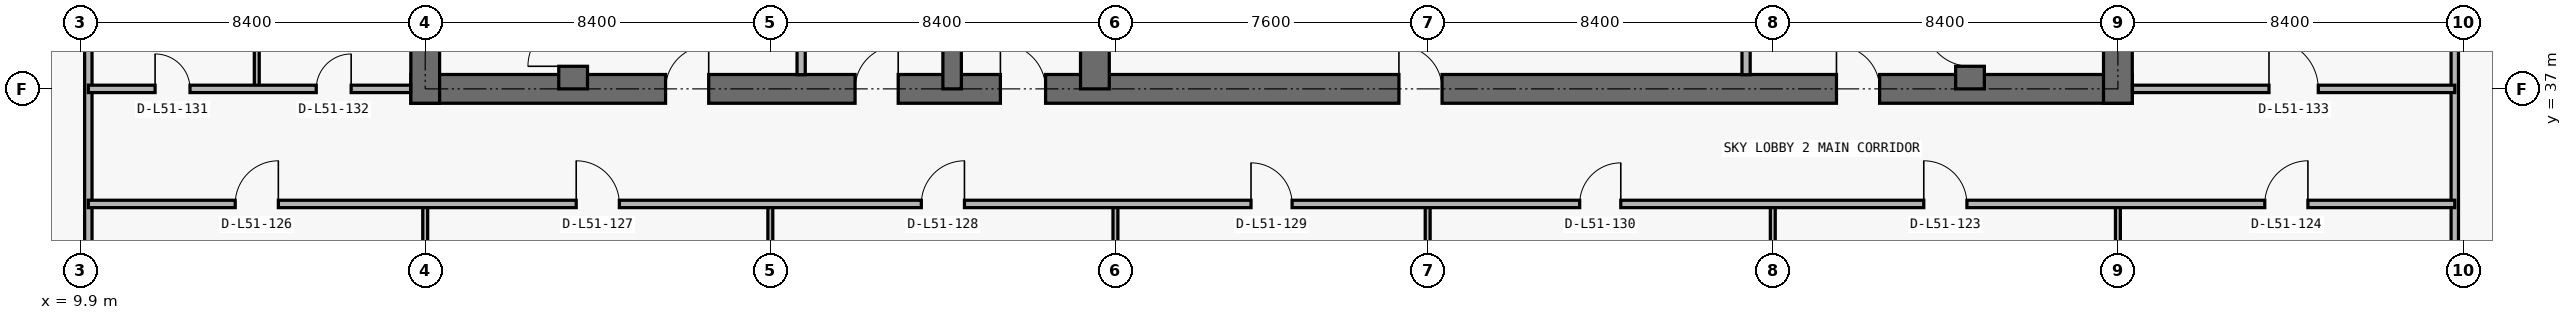
"""IFC4 building model, lengths in metres.
Left out: names, types, materials, properties, quantities, classifications, styles, units other than length and angle.
Written with IfcOpenShell. Run it as: python <this file> out.ifc"""

import sys

from ifc_helpers import new_model, si_unit, direction, frame, frame_2d, origin, place, context, subcontext, project, spatial, rectangle, extrude, element, fill, save


model = new_model("IFC4")
c1 = context("Model", 3, precision=1e-05, world=origin(), true_north=direction((0.0, 1.0)))
c2 = subcontext(c1, "Body", "Model", "MODEL_VIEW")
j1 = project(units=[si_unit("LENGTHUNIT", "METRE"), si_unit("PLANEANGLEUNIT", "RADIAN")], contexts=[c1])
p1 = place(None, origin())
s1 = spatial("IfcSite", under=j1, at=p1, CompositionType="ELEMENT")
p2 = place(p1, origin())
s2 = spatial("IfcBuilding", under=s1, at=p2, CompositionType="ELEMENT")
p3 = place(p2, frame((0.0, 0.0, 183.6)))
s3 = spatial("IfcBuildingStorey", under=s2, at=p3, CompositionType="ELEMENT", Elevation=183.6)
p4 = place(p3, frame((17.95, 37.0, 0.0), z_axis=(0.0, 0.0, 1.0), x_axis=(1.0, 0.0, 0.0)))
e1 = element("IfcWall", 1, at=p4, inside=s3, PredefinedType="SHEAR", context=c2, shape_type="SweptSolid", body=[
    extrude(rectangle(XDim=41.9, YDim=0.7, at=frame_2d((20.95, 0.0))), origin(), (0.0, 0.0, 1.0), 4.55),
])
p5 = place(p4, frame((14.35, 0.0, 0.0)))
e2 = element("IfcOpeningElement", 2, at=p5, cuts=e1, PredefinedType="OPENING", context=c2, shape_type="SweptSolid", body=[
    extrude(rectangle(XDim=1.1, YDim=2.15, at=frame_2d((0.55, 1.075))), frame((0.0, 0.36, 0.0), z_axis=(0.0, -1.0, 0.0), x_axis=(1.0, 0.0, 0.0)), (0.0, 0.0, 1.0), 0.72),
])
p6 = place(p4, frame((6.2, 0.0, 0.0)))
e3 = element("IfcOpeningElement", 3, at=p6, cuts=e1, PredefinedType="OPENING", context=c2, shape_type="SweptSolid", body=[
    extrude(rectangle(XDim=1.05, YDim=2.15, at=frame_2d((0.525, 1.075))), frame((0.0, 0.36, 0.0), z_axis=(0.0, -1.0, 0.0), x_axis=(1.0, 0.0, 0.0)), (0.0, 0.0, 1.0), 0.72),
])
p7 = place(p4, frame((34.7, 0.0, 0.0)))
e4 = element("IfcOpeningElement", 4, at=p7, cuts=e1, PredefinedType="OPENING", context=c2, shape_type="SweptSolid", body=[
    extrude(rectangle(XDim=1.05, YDim=2.15, at=frame_2d((0.525, 1.075))), frame((0.0, 0.36, 0.0), z_axis=(0.0, -1.0, 0.0), x_axis=(1.0, 0.0, 0.0)), (0.0, 0.0, 1.0), 0.72),
])
p8 = place(p4, frame((10.812, 0.0, 0.0)))
e5 = element("IfcOpeningElement", 5, at=p8, cuts=e1, PredefinedType="OPENING", context=c2, shape_type="SweptSolid", body=[
    extrude(rectangle(XDim=1.05, YDim=2.15, at=frame_2d((0.525, 1.075))), frame((0.0, 0.36, 0.0), z_axis=(0.0, -1.0, 0.0), x_axis=(1.0, 0.0, 0.0)), (0.0, 0.0, 1.0), 0.72),
])
p9 = place(p4, frame((24.05, 0.0, 0.0)))
e6 = element("IfcOpeningElement", 6, at=p9, cuts=e1, PredefinedType="OPENING", context=c2, shape_type="SweptSolid", body=[
    extrude(rectangle(XDim=1.05, YDim=2.15, at=frame_2d((0.525, 1.075))), frame((0.0, 0.36, 0.0), z_axis=(0.0, -1.0, 0.0), x_axis=(1.0, 0.0, 0.0)), (0.0, 0.0, 1.0), 0.72),
])
for number, where, z_axis, x_axis in (
    (7, (18.3, 36.65, 0.0), (0.0, 0.0, 1.0), (0.0, 1.0, 0.0)),
    (8, (59.5, 36.65, 0.0), (0.0, 0.0, 1.0), (0.0, 1.0, 0.0)),
):
    element("IfcWall", number, at=place(p3, frame(where, z_axis=z_axis, x_axis=x_axis)), inside=s3, PredefinedType="SHEAR", context=c2, shape_type="SweptSolid", body=[
        extrude(rectangle(XDim=13.95, YDim=0.7, at=frame_2d((6.975, 0.0))), origin(), (0.0, 0.0, 1.0), 4.55),
    ])
p10 = place(p3, frame((21.9, 37.0, 0.0), z_axis=(0.0, 0.0, 1.0), x_axis=(0.0, 1.0, 0.0)))
e9 = element("IfcWall", 9, at=p10, inside=s3, PredefinedType="SHEAR", context=c2, shape_type="SweptSolid", body=[
    extrude(rectangle(XDim=9.575, YDim=0.7, at=frame_2d((4.788, 0.0))), origin(), (0.0, 0.0, 1.0), 4.55),
])
p11 = place(p10, frame((0.55, 0.0, 0.0)))
e10 = element("IfcOpeningElement", 10, at=p11, cuts=e9, PredefinedType="OPENING", context=c2, shape_type="SweptSolid", body=[
    extrude(rectangle(XDim=1.1, YDim=2.15, at=frame_2d((0.55, 1.075))), frame((0.0, 0.36, 0.0), z_axis=(0.0, -1.0, 0.0), x_axis=(1.0, 0.0, 0.0)), (0.0, 0.0, 1.0), 0.72),
])
p12 = place(p3, frame((55.9, 37.0, 0.0), z_axis=(0.0, 0.0, 1.0), x_axis=(0.0, 1.0, 0.0)))
e11 = element("IfcWall", 11, at=p12, inside=s3, PredefinedType="SHEAR", context=c2, shape_type="SweptSolid", body=[
    extrude(rectangle(XDim=9.575, YDim=0.7, at=frame_2d((4.788, 0.0))), origin(), (0.0, 0.0, 1.0), 4.55),
])
p13 = place(p12, frame((0.55, 0.0, 0.0)))
e12 = element("IfcOpeningElement", 12, at=p13, cuts=e11, PredefinedType="OPENING", context=c2, shape_type="SweptSolid", body=[
    extrude(rectangle(XDim=1.1, YDim=2.15, at=frame_2d((0.55, 1.075))), frame((0.0, 0.36, 0.0), z_axis=(0.0, -1.0, 0.0), x_axis=(1.0, 0.0, 0.0)), (0.0, 0.0, 1.0), 0.72),
])
p14 = place(p3, frame((31.125, 37.0, 0.0), z_axis=(0.0, 0.0, 1.0), x_axis=(0.0, 1.0, 0.0)))
e13 = element("IfcWall", 13, at=p14, inside=s3, PredefinedType="SHEAR", context=c2, shape_type="SweptSolid", body=[
    extrude(rectangle(XDim=9.575, YDim=0.45, at=frame_2d((4.788, 0.0))), origin(), (0.0, 0.0, 1.0), 4.55),
])
p15 = place(p3, frame((34.6, 37.0, 0.0), z_axis=(0.0, 0.0, 1.0), x_axis=(0.0, 1.0, 0.0)))
e14 = element("IfcWall", 14, at=p15, inside=s3, PredefinedType="SHEAR", context=c2, shape_type="SweptSolid", body=[
    extrude(rectangle(XDim=9.575, YDim=0.7, at=frame_2d((4.788, 0.0))), origin(), (0.0, 0.0, 1.0), 4.55),
])
p16 = place(p3, frame((10.1, 11.285, 0.0), z_axis=(0.0, 0.0, 1.0), x_axis=(0.0, 1.0, 0.0)))
e15 = element("IfcWall", 15, at=p16, inside=s3, PredefinedType="PARTITIONING", context=c2, shape_type="SweptSolid", body=[
    extrude(rectangle(XDim=35.595, YDim=0.18, at=frame_2d((17.797, 0.0))), origin(), (0.0, 0.0, 1.0), 3.514),
])
p17 = place(p3, frame((14.2, 37.0, 0.0), z_axis=(0.0, 0.0, 1.0), x_axis=(0.0, 1.0, 0.0)))
e16 = element("IfcWall", 16, at=p17, inside=s3, PredefinedType="PARTITIONING", context=c2, shape_type="SweptSolid", body=[
    extrude(rectangle(XDim=6.8, YDim=0.12, at=frame_2d((3.4, 0.0))), origin(), (0.0, 0.0, 1.0), 3.923),
])
p18 = place(p3, frame((18.3, 7.895, 0.0), z_axis=(0.0, 0.0, 1.0), x_axis=(0.0, 1.0, 0.0)))
e17 = element("IfcWall", 17, at=p18, inside=s3, PredefinedType="PARTITIONING", context=c2, shape_type="SweptSolid", body=[
    extrude(rectangle(XDim=26.305, YDim=0.12, at=frame_2d((13.152, 0.0))), origin(), (0.0, 0.0, 1.0), 3.514),
])
p19 = place(p3, frame((26.7, 29.405, 0.0), z_axis=(0.0, 0.0, 1.0), x_axis=(0.0, 1.0, 0.0)))
e18 = element("IfcWall", 18, at=p19, inside=s3, PredefinedType="PARTITIONING", context=c2, shape_type="SweptSolid", body=[
    extrude(rectangle(XDim=4.795, YDim=0.12, at=frame_2d((2.397, 0.0))), origin(), (0.0, 0.0, 1.0), 3.835),
])
p20 = place(p3, frame((27.45, 37.345, 0.0), z_axis=(0.0, 0.0, 1.0), x_axis=(0.0, 1.0, 0.0)))
e19 = element("IfcWall", 19, at=p20, inside=s3, PredefinedType="PARTITIONING", context=c2, shape_type="SweptSolid", body=[
    extrude(rectangle(XDim=5.385, YDim=0.2, at=frame_2d((2.692, 0.0))), origin(), (0.0, 0.0, 1.0), 4.55),
])
for number, where, z_axis, x_axis in (
    (20, (35.1, 7.855, 0.0), (0.0, 0.0, 1.0), (0.0, 1.0, 0.0)),
    (21, (42.7, 7.855, 0.0), (0.0, 0.0, 1.0), (0.0, 1.0, 0.0)),
):
    element("IfcWall", number, at=place(p3, frame(where, z_axis=z_axis, x_axis=x_axis)), inside=s3, PredefinedType="PARTITIONING", context=c2, shape_type="SweptSolid", body=[
        extrude(rectangle(XDim=26.345, YDim=0.12, at=frame_2d((13.172, 0.0))), origin(), (0.0, 0.0, 1.0), 3.514),
    ])
p21 = place(p3, frame((50.45, 37.345, 0.0), z_axis=(0.0, 0.0, 1.0), x_axis=(0.0, 1.0, 0.0)))
e22 = element("IfcWall", 22, at=p21, inside=s3, PredefinedType="PARTITIONING", context=c2, shape_type="SweptSolid", body=[
    extrude(rectangle(XDim=5.385, YDim=0.2, at=frame_2d((2.692, 0.0))), origin(), (0.0, 0.0, 1.0), 4.55),
])
p22 = place(p3, frame((51.1, 29.405, 0.0), z_axis=(0.0, 0.0, 1.0), x_axis=(0.0, 1.0, 0.0)))
e23 = element("IfcWall", 23, at=p22, inside=s3, PredefinedType="PARTITIONING", context=c2, shape_type="SweptSolid", body=[
    extrude(rectangle(XDim=4.795, YDim=0.12, at=frame_2d((2.397, 0.0))), origin(), (0.0, 0.0, 1.0), 3.835),
])
p23 = place(p3, frame((59.5, 7.895, 0.0), z_axis=(0.0, 0.0, 1.0), x_axis=(0.0, 1.0, 0.0)))
e24 = element("IfcWall", 24, at=p23, inside=s3, PredefinedType="PARTITIONING", context=c2, shape_type="SweptSolid", body=[
    extrude(rectangle(XDim=26.305, YDim=0.12, at=frame_2d((13.152, 0.0))), origin(), (0.0, 0.0, 1.0), 3.514),
])
p24 = place(p3, frame((67.7, 11.32, 0.0), z_axis=(0.0, 0.0, 1.0), x_axis=(0.0, 1.0, 0.0)))
e25 = element("IfcWall", 25, at=p24, inside=s3, PredefinedType="PARTITIONING", context=c2, shape_type="SweptSolid", body=[
    extrude(rectangle(XDim=35.56, YDim=0.18, at=frame_2d((17.78, 0.0))), origin(), (0.0, 0.0, 1.0), 3.514),
])
p25 = place(p3, frame((10.1, 34.2, 0.0), z_axis=(0.0, 0.0, 1.0), x_axis=(1.0, 0.0, 0.0)))
e26 = element("IfcWall", 26, at=p25, inside=s3, PredefinedType="PARTITIONING", context=c2, shape_type="SweptSolid", body=[
    extrude(rectangle(XDim=57.6, YDim=0.18, at=frame_2d((28.8, 0.0))), origin(), (0.0, 0.0, 1.0), 4.55),
])
p26 = place(p25, frame((44.675, 0.0, 0.0)))
e27 = element("IfcOpeningElement", 27, at=p26, cuts=e26, PredefinedType="OPENING", context=c2, shape_type="SweptSolid", body=[
    extrude(rectangle(XDim=1.05, YDim=2.15, at=frame_2d((0.525, 1.075))), frame((0.0, 0.1, 0.0), z_axis=(0.0, -1.0, 0.0), x_axis=(1.0, 0.0, 0.0)), (0.0, 0.0, 1.0), 0.2),
])
p27 = place(p25, frame((52.975, 0.0, 0.0)))
e28 = element("IfcOpeningElement", 28, at=p27, cuts=e26, PredefinedType="OPENING", context=c2, shape_type="SweptSolid", body=[
    extrude(rectangle(XDim=1.05, YDim=2.15, at=frame_2d((0.525, 1.075))), frame((0.0, 0.1, 0.0), z_axis=(0.0, -1.0, 0.0), x_axis=(1.0, 0.0, 0.0)), (0.0, 0.0, 1.0), 0.2),
])
p28 = place(p25, frame((3.575, 0.0, 0.0)))
e29 = element("IfcOpeningElement", 29, at=p28, cuts=e26, PredefinedType="OPENING", context=c2, shape_type="SweptSolid", body=[
    extrude(rectangle(XDim=1.05, YDim=2.15, at=frame_2d((0.525, 1.075))), frame((0.0, 0.1, 0.0), z_axis=(0.0, -1.0, 0.0), x_axis=(1.0, 0.0, 0.0)), (0.0, 0.0, 1.0), 0.2),
])
p29 = place(p25, frame((11.875, 0.0, 0.0)))
e30 = element("IfcOpeningElement", 30, at=p29, cuts=e26, PredefinedType="OPENING", context=c2, shape_type="SweptSolid", body=[
    extrude(rectangle(XDim=1.05, YDim=2.15, at=frame_2d((0.525, 1.075))), frame((0.0, 0.1, 0.0), z_axis=(0.0, -1.0, 0.0), x_axis=(1.0, 0.0, 0.0)), (0.0, 0.0, 1.0), 0.2),
])
p30 = place(p25, frame((20.275, 0.0, 0.0)))
e31 = element("IfcOpeningElement", 31, at=p30, cuts=e26, PredefinedType="OPENING", context=c2, shape_type="SweptSolid", body=[
    extrude(rectangle(XDim=1.05, YDim=2.15, at=frame_2d((0.525, 1.075))), frame((0.0, 0.1, 0.0), z_axis=(0.0, -1.0, 0.0), x_axis=(1.0, 0.0, 0.0)), (0.0, 0.0, 1.0), 0.2),
])
p31 = place(p25, frame((28.3, 0.0, 0.0)))
e32 = element("IfcOpeningElement", 32, at=p31, cuts=e26, PredefinedType="OPENING", context=c2, shape_type="SweptSolid", body=[
    extrude(rectangle(XDim=1.0, YDim=2.2, at=frame_2d((0.5, 1.1))), frame((0.0, 0.1, 0.0), z_axis=(0.0, -1.0, 0.0), x_axis=(1.0, 0.0, 0.0)), (0.0, 0.0, 1.0), 0.2),
])
p32 = place(p25, frame((36.3, 0.0, 0.0)))
e33 = element("IfcOpeningElement", 33, at=p32, cuts=e26, PredefinedType="OPENING", context=c2, shape_type="SweptSolid", body=[
    extrude(rectangle(XDim=1.0, YDim=2.2, at=frame_2d((0.5, 1.1))), frame((0.0, 0.1, 0.0), z_axis=(0.0, -1.0, 0.0), x_axis=(1.0, 0.0, 0.0)), (0.0, 0.0, 1.0), 0.2),
])
p33 = place(p3, frame((10.1, 37.0, 0.0), z_axis=(0.0, 0.0, 1.0), x_axis=(1.0, 0.0, 0.0)))
e34 = element("IfcWall", 34, at=p33, inside=s3, PredefinedType="PARTITIONING", context=c2, shape_type="SweptSolid", body=[
    extrude(rectangle(XDim=7.845, YDim=0.18, at=frame_2d((3.922, 0.0))), origin(), (0.0, 0.0, 1.0), 4.55),
])
p34 = place(p33, frame((1.625, 0.0, 0.0)))
e35 = element("IfcOpeningElement", 35, at=p34, cuts=e34, PredefinedType="OPENING", context=c2, shape_type="SweptSolid", body=[
    extrude(rectangle(XDim=0.85, YDim=2.1, at=frame_2d((0.425, 1.05))), frame((0.0, 0.1, 0.0), z_axis=(0.0, -1.0, 0.0), x_axis=(1.0, 0.0, 0.0)), (0.0, 0.0, 1.0), 0.2),
])
p35 = place(p33, frame((5.548, 0.0, 0.0)))
e36 = element("IfcOpeningElement", 36, at=p35, cuts=e34, PredefinedType="OPENING", context=c2, shape_type="SweptSolid", body=[
    extrude(rectangle(XDim=0.85, YDim=2.1, at=frame_2d((0.425, 1.05))), frame((0.0, 0.1, 0.0), z_axis=(0.0, -1.0, 0.0), x_axis=(1.0, 0.0, 0.0)), (0.0, 0.0, 1.0), 0.2),
])
p36 = place(p3, frame((59.855, 37.0, 0.0), z_axis=(0.0, 0.0, 1.0), x_axis=(1.0, 0.0, 0.0)))
e37 = element("IfcWall", 37, at=p36, inside=s3, PredefinedType="PARTITIONING", context=c2, shape_type="SweptSolid", body=[
    extrude(rectangle(XDim=7.845, YDim=0.18, at=frame_2d((3.922, 0.0))), origin(), (0.0, 0.0, 1.0), 4.55),
])
p37 = place(p36, frame((3.323, 0.0, 0.0)))
e38 = element("IfcOpeningElement", 38, at=p37, cuts=e37, PredefinedType="OPENING", context=c2, shape_type="SweptSolid", body=[
    extrude(rectangle(XDim=1.2, YDim=2.2, at=frame_2d((0.6, 1.1))), frame((0.0, 0.1, 0.0), z_axis=(0.0, -1.0, 0.0), x_axis=(1.0, 0.0, 0.0)), (0.0, 0.0, 1.0), 0.2),
])
p38 = place(p5, origin())
e39 = element("IfcDoor", 39, at=p38, inside=s3, OperationType="SINGLE_SWING_LEFT", PredefinedType="DOOR", context=c2, shape_type="SweptSolid", body=[
    extrude(rectangle(XDim=1.1, YDim=2.15, at=frame_2d((0.55, 1.075))), frame((0.0, 0.025, 0.0), z_axis=(0.0, -1.0, 0.0), x_axis=(1.0, 0.0, 0.0)), (0.0, 0.0, 1.0), 0.05),
])
fill(e2, e39)
p39 = place(p6, origin())
e40 = element("IfcDoor", 40, at=p39, inside=s3, OperationType="SINGLE_SWING_RIGHT", PredefinedType="DOOR", context=c2, shape_type="SweptSolid", body=[
    extrude(rectangle(XDim=1.05, YDim=2.15, at=frame_2d((0.525, 1.075))), frame((0.0, 0.025, 0.0), z_axis=(0.0, -1.0, 0.0), x_axis=(1.0, 0.0, 0.0)), (0.0, 0.0, 1.0), 0.05),
])
fill(e3, e40)
p40 = place(p11, origin())
e41 = element("IfcDoor", 41, at=p40, inside=s3, OperationType="SINGLE_SWING_LEFT", PredefinedType="DOOR", context=c2, shape_type="SweptSolid", body=[
    extrude(rectangle(XDim=1.1, YDim=2.15, at=frame_2d((0.55, 1.075))), frame((0.0, 0.025, 0.0), z_axis=(0.0, -1.0, 0.0), x_axis=(1.0, 0.0, 0.0)), (0.0, 0.0, 1.0), 0.05),
])
fill(e10, e41)
p41 = place(p7, origin())
e42 = element("IfcDoor", 42, at=p41, inside=s3, OperationType="SINGLE_SWING_LEFT", PredefinedType="DOOR", context=c2, shape_type="SweptSolid", body=[
    extrude(rectangle(XDim=1.05, YDim=2.15, at=frame_2d((0.525, 1.075))), frame((0.0, 0.025, 0.0), z_axis=(0.0, -1.0, 0.0), x_axis=(1.0, 0.0, 0.0)), (0.0, 0.0, 1.0), 0.05),
])
fill(e4, e42)
p42 = place(p13, origin())
e43 = element("IfcDoor", 43, at=p42, inside=s3, OperationType="SINGLE_SWING_RIGHT", PredefinedType="DOOR", context=c2, shape_type="SweptSolid", body=[
    extrude(rectangle(XDim=1.1, YDim=2.15, at=frame_2d((0.55, 1.075))), frame((0.0, 0.025, 0.0), z_axis=(0.0, -1.0, 0.0), x_axis=(1.0, 0.0, 0.0)), (0.0, 0.0, 1.0), 0.05),
])
fill(e12, e43)
p43 = place(p8, origin())
e44 = element("IfcDoor", 44, at=p43, inside=s3, OperationType="SINGLE_SWING_RIGHT", PredefinedType="DOOR", context=c2, shape_type="SweptSolid", body=[
    extrude(rectangle(XDim=1.05, YDim=2.15, at=frame_2d((0.525, 1.075))), frame((0.0, 0.025, 0.0), z_axis=(0.0, -1.0, 0.0), x_axis=(1.0, 0.0, 0.0)), (0.0, 0.0, 1.0), 0.05),
])
fill(e5, e44)
p44 = place(p9, origin())
e45 = element("IfcDoor", 45, at=p44, inside=s3, OperationType="SINGLE_SWING_LEFT", PredefinedType="DOOR", context=c2, shape_type="SweptSolid", body=[
    extrude(rectangle(XDim=1.05, YDim=2.15, at=frame_2d((0.525, 1.075))), frame((0.0, 0.025, 0.0), z_axis=(0.0, -1.0, 0.0), x_axis=(1.0, 0.0, 0.0)), (0.0, 0.0, 1.0), 0.05),
])
fill(e6, e45)
p45 = place(p26, origin())
e46 = element("IfcDoor", 46, at=p45, inside=s3, OperationType="SINGLE_SWING_LEFT", PredefinedType="DOOR", context=c2, shape_type="SweptSolid", body=[
    extrude(rectangle(XDim=1.05, YDim=2.15, at=frame_2d((0.525, 1.075))), frame((0.0, 0.025, 0.0), z_axis=(0.0, -1.0, 0.0), x_axis=(1.0, 0.0, 0.0)), (0.0, 0.0, 1.0), 0.05),
])
fill(e27, e46)
p46 = place(p27, origin())
e47 = element("IfcDoor", 47, at=p46, inside=s3, OperationType="SINGLE_SWING_RIGHT", PredefinedType="DOOR", context=c2, shape_type="SweptSolid", body=[
    extrude(rectangle(XDim=1.05, YDim=2.15, at=frame_2d((0.525, 1.075))), frame((0.0, 0.025, 0.0), z_axis=(0.0, -1.0, 0.0), x_axis=(1.0, 0.0, 0.0)), (0.0, 0.0, 1.0), 0.05),
])
fill(e28, e47)
p47 = place(p28, origin())
e48 = element("IfcDoor", 48, at=p47, inside=s3, OperationType="SINGLE_SWING_RIGHT", PredefinedType="DOOR", context=c2, shape_type="SweptSolid", body=[
    extrude(rectangle(XDim=1.05, YDim=2.15, at=frame_2d((0.525, 1.075))), frame((0.0, 0.025, 0.0), z_axis=(0.0, -1.0, 0.0), x_axis=(1.0, 0.0, 0.0)), (0.0, 0.0, 1.0), 0.05),
])
fill(e29, e48)
p48 = place(p29, origin())
e49 = element("IfcDoor", 49, at=p48, inside=s3, OperationType="SINGLE_SWING_LEFT", PredefinedType="DOOR", context=c2, shape_type="SweptSolid", body=[
    extrude(rectangle(XDim=1.05, YDim=2.15, at=frame_2d((0.525, 1.075))), frame((0.0, 0.025, 0.0), z_axis=(0.0, -1.0, 0.0), x_axis=(1.0, 0.0, 0.0)), (0.0, 0.0, 1.0), 0.05),
])
fill(e30, e49)
p49 = place(p30, origin())
e50 = element("IfcDoor", 50, at=p49, inside=s3, OperationType="SINGLE_SWING_RIGHT", PredefinedType="DOOR", context=c2, shape_type="SweptSolid", body=[
    extrude(rectangle(XDim=1.05, YDim=2.15, at=frame_2d((0.525, 1.075))), frame((0.0, 0.025, 0.0), z_axis=(0.0, -1.0, 0.0), x_axis=(1.0, 0.0, 0.0)), (0.0, 0.0, 1.0), 0.05),
])
fill(e31, e50)
p50 = place(p31, origin())
e51 = element("IfcDoor", 51, at=p50, inside=s3, OperationType="SINGLE_SWING_LEFT", PredefinedType="DOOR", context=c2, shape_type="SweptSolid", body=[
    extrude(rectangle(XDim=1.0, YDim=2.2, at=frame_2d((0.5, 1.1))), frame((0.0, 0.025, 0.0), z_axis=(0.0, -1.0, 0.0), x_axis=(1.0, 0.0, 0.0)), (0.0, 0.0, 1.0), 0.05),
])
fill(e32, e51)
p51 = place(p32, origin())
e52 = element("IfcDoor", 52, at=p51, inside=s3, OperationType="SINGLE_SWING_RIGHT", PredefinedType="DOOR", context=c2, shape_type="SweptSolid", body=[
    extrude(rectangle(XDim=1.0, YDim=2.2, at=frame_2d((0.5, 1.1))), frame((0.0, 0.025, 0.0), z_axis=(0.0, -1.0, 0.0), x_axis=(1.0, 0.0, 0.0)), (0.0, 0.0, 1.0), 0.05),
])
fill(e33, e52)
p52 = place(p34, origin())
e53 = element("IfcDoor", 53, at=p52, inside=s3, OperationType="SINGLE_SWING_LEFT", PredefinedType="DOOR", context=c2, shape_type="SweptSolid", body=[
    extrude(rectangle(XDim=0.85, YDim=2.1, at=frame_2d((0.425, 1.05))), frame((0.0, 0.025, 0.0), z_axis=(0.0, -1.0, 0.0), x_axis=(1.0, 0.0, 0.0)), (0.0, 0.0, 1.0), 0.05),
])
fill(e35, e53)
p53 = place(p35, origin())
e54 = element("IfcDoor", 54, at=p53, inside=s3, OperationType="SINGLE_SWING_RIGHT", PredefinedType="DOOR", context=c2, shape_type="SweptSolid", body=[
    extrude(rectangle(XDim=0.85, YDim=2.1, at=frame_2d((0.425, 1.05))), frame((0.0, 0.025, 0.0), z_axis=(0.0, -1.0, 0.0), x_axis=(1.0, 0.0, 0.0)), (0.0, 0.0, 1.0), 0.05),
])
fill(e36, e54)
p54 = place(p37, origin())
e55 = element("IfcDoor", 55, at=p54, inside=s3, OperationType="SINGLE_SWING_LEFT", PredefinedType="DOOR", context=c2, shape_type="SweptSolid", body=[
    extrude(rectangle(XDim=1.2, YDim=2.2, at=frame_2d((0.6, 1.1))), frame((0.0, 0.025, 0.0), z_axis=(0.0, -1.0, 0.0), x_axis=(1.0, 0.0, 0.0)), (0.0, 0.0, 1.0), 0.05),
])
fill(e38, e55)
save(model, sys.argv[1])
